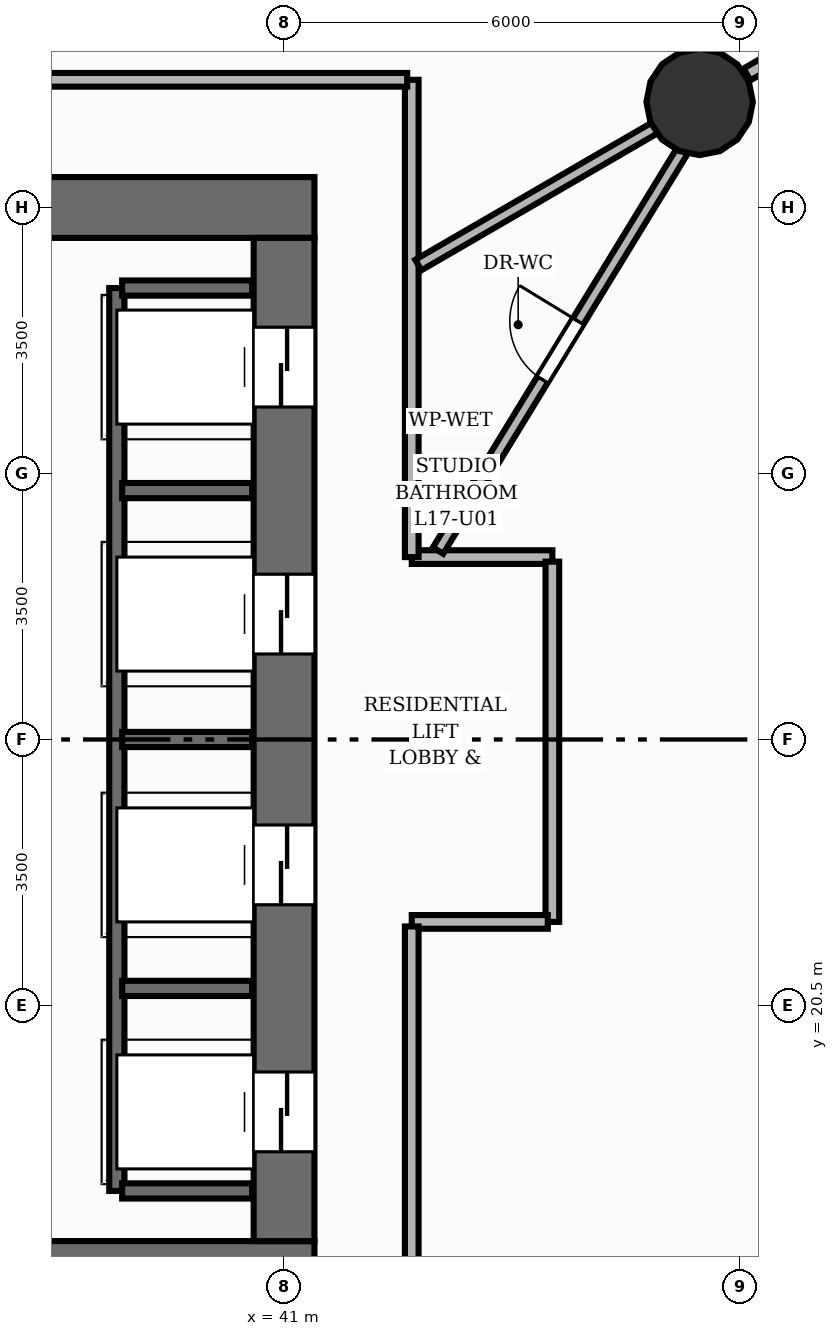
"""IFC4 building model, lengths in metres.
Left out: names, types, materials, properties, quantities, classifications, styles, units other than length and angle.
Written with IfcOpenShell. Run it as: python <this file> out.ifc"""

import sys

from ifc_helpers import new_model, si_unit, direction, frame, frame_2d, origin, origin_2d, place, context, subcontext, project, spatial, rectangle, circle, extrude, element, fill, save


model = new_model("IFC4")
c1 = context("Model", 3, precision=1e-05, world=origin(), true_north=direction((0.0, 1.0)))
c2 = subcontext(c1, "Body", "Model", "MODEL_VIEW")
j1 = project(units=[si_unit("LENGTHUNIT", "METRE"), si_unit("PLANEANGLEUNIT", "RADIAN")], contexts=[c1])
p1 = place(None, origin())
s1 = spatial("IfcSite", under=j1, at=p1, CompositionType="ELEMENT")
p2 = place(p1, origin())
s2 = spatial("IfcBuilding", under=s1, at=p2, CompositionType="ELEMENT")
p3 = place(p2, frame((0.0, 0.0, 60.0)))
s3 = spatial("IfcBuildingStorey", under=s2, at=p3, CompositionType="ELEMENT", Elevation=60.0)
p4 = place(p3, frame((22.6, 17.0, 0.0), z_axis=(0.0, 0.0, 1.0), x_axis=(1.0, 0.0, 0.0)))
e1 = element("IfcWall", 1, at=p4, inside=s3, PredefinedType="SHEAR", context=c2, shape_type="SweptSolid", body=[
    extrude(rectangle(XDim=18.8, YDim=0.8, at=frame_2d((9.4, 0.0))), origin(), (0.0, 0.0, 1.0), 3.2),
])
p5 = place(p4, frame((5.9, 0.0, 0.0)))
e2 = element("IfcOpeningElement", 2, at=p5, cuts=e1, PredefinedType="OPENING", context=c2, shape_type="SweptSolid", body=[
    extrude(rectangle(XDim=1.1, YDim=2.15, at=frame_2d((0.55, 1.075))), frame((0.0, 0.41, 0.0), z_axis=(0.0, -1.0, 0.0), x_axis=(1.0, 0.0, 0.0)), (0.0, 0.0, 1.0), 0.82),
])
p6 = place(p4, frame((9.45, 0.0, 0.0)))
e3 = element("IfcOpeningElement", 3, at=p6, cuts=e1, PredefinedType="OPENING", context=c2, shape_type="SweptSolid", body=[
    extrude(rectangle(XDim=0.9, YDim=2.1, at=frame_2d((0.45, 1.05))), frame((0.0, 0.41, 0.0), z_axis=(0.0, -1.0, 0.0), x_axis=(1.0, 0.0, 0.0)), (0.0, 0.0, 1.0), 0.82),
])
p7 = place(p3, frame((22.6, 31.0, 0.0), z_axis=(0.0, 0.0, 1.0), x_axis=(1.0, 0.0, 0.0)))
e4 = element("IfcWall", 4, at=p7, inside=s3, PredefinedType="SHEAR", context=c2, shape_type="SweptSolid", body=[
    extrude(rectangle(XDim=18.8, YDim=0.8, at=frame_2d((9.4, 0.0))), origin(), (0.0, 0.0, 1.0), 3.2),
])
p8 = place(p7, frame((11.8, 0.0, 0.0)))
e5 = element("IfcOpeningElement", 5, at=p8, cuts=e4, PredefinedType="OPENING", context=c2, shape_type="SweptSolid", body=[
    extrude(rectangle(XDim=1.1, YDim=2.15, at=frame_2d((0.55, 1.075))), frame((0.0, 0.41, 0.0), z_axis=(0.0, -1.0, 0.0), x_axis=(1.0, 0.0, 0.0)), (0.0, 0.0, 1.0), 0.82),
])
p9 = place(p3, frame((41.0, 17.4, 0.0), z_axis=(0.0, 0.0, 1.0), x_axis=(0.0, 1.0, 0.0)))
e6 = element("IfcWall", 6, at=p9, inside=s3, PredefinedType="SHEAR", context=c2, shape_type="SweptSolid", body=[
    extrude(rectangle(XDim=13.2, YDim=0.8, at=frame_2d((6.6, 0.0))), origin(), (0.0, 0.0, 1.0), 3.2),
])
p10 = place(p9, frame((1.175, 0.0, 0.0)))
e7 = element("IfcOpeningElement", 7, at=p10, cuts=e6, PredefinedType="OPENING", context=c2, shape_type="SweptSolid", body=[
    extrude(rectangle(XDim=1.05, YDim=2.15, at=frame_2d((0.525, 1.075))), frame((0.0, 0.41, 0.0), z_axis=(0.0, -1.0, 0.0), x_axis=(1.0, 0.0, 0.0)), (0.0, 0.0, 1.0), 0.82),
])
p11 = place(p9, frame((4.425, 0.0, 0.0)))
e8 = element("IfcOpeningElement", 8, at=p11, cuts=e6, PredefinedType="OPENING", context=c2, shape_type="SweptSolid", body=[
    extrude(rectangle(XDim=1.05, YDim=2.15, at=frame_2d((0.525, 1.075))), frame((0.0, 0.41, 0.0), z_axis=(0.0, -1.0, 0.0), x_axis=(1.0, 0.0, 0.0)), (0.0, 0.0, 1.0), 0.82),
])
p12 = place(p9, frame((7.725, 0.0, 0.0)))
e9 = element("IfcOpeningElement", 9, at=p12, cuts=e6, PredefinedType="OPENING", context=c2, shape_type="SweptSolid", body=[
    extrude(rectangle(XDim=1.05, YDim=2.15, at=frame_2d((0.525, 1.075))), frame((0.0, 0.41, 0.0), z_axis=(0.0, -1.0, 0.0), x_axis=(1.0, 0.0, 0.0)), (0.0, 0.0, 1.0), 0.82),
])
p13 = place(p9, frame((10.975, 0.0, 0.0)))
e10 = element("IfcOpeningElement", 10, at=p13, cuts=e6, PredefinedType="OPENING", context=c2, shape_type="SweptSolid", body=[
    extrude(rectangle(XDim=1.05, YDim=2.15, at=frame_2d((0.525, 1.075))), frame((0.0, 0.41, 0.0), z_axis=(0.0, -1.0, 0.0), x_axis=(1.0, 0.0, 0.0)), (0.0, 0.0, 1.0), 0.82),
])
p14 = place(p3, frame((46.468, 32.389, 0.0), z_axis=(0.0, 0.0, 1.0), x_axis=(1.0, 0.0, 0.0)))
e11 = element("IfcColumn", 11, at=p14, inside=s3, PredefinedType="COLUMN", context=c2, shape_type="SweptSolid", body=[
    extrude(circle(Radius=0.7, at=origin_2d()), origin(), (0.0, 0.0, 1.0), 3.2),
])
p15 = place(p3, frame((38.8, 18.06, 0.0), z_axis=(0.0, 0.0, 1.0), x_axis=(0.0, 1.0, 0.0)))
e12 = element("IfcWall", 12, at=p15, inside=s3, PredefinedType="SHEAR", context=c2, shape_type="SweptSolid", body=[
    extrude(rectangle(XDim=11.88, YDim=0.2, at=frame_2d((5.94, 0.0))), origin(), (0.0, 0.0, 1.0), 3.2),
])
for number, where, z_axis, x_axis in (
    (13, (38.87, 18.06, 0.0), (0.0, 0.0, 1.0), (1.0, 0.0, 0.0)),
    (14, (38.87, 29.94, 0.0), (0.0, 0.0, 1.0), (1.0, 0.0, 0.0)),
    (15, (38.87, 20.725, 0.0), (0.0, 0.0, 1.0), (1.0, 0.0, 0.0)),
    (16, (38.87, 24.0, 0.0), (0.0, 0.0, 1.0), (1.0, 0.0, 0.0)),
    (17, (38.87, 27.275, 0.0), (0.0, 0.0, 1.0), (1.0, 0.0, 0.0)),
):
    element("IfcWall", number, at=place(p3, frame(where, z_axis=z_axis, x_axis=x_axis)), inside=s3, PredefinedType="SHEAR", context=c2, shape_type="SweptSolid", body=[
        extrude(rectangle(XDim=1.71, YDim=0.2, at=frame_2d((0.855, 0.0))), origin(), (0.0, 0.0, 1.0), 3.2),
    ])
p16 = place(p3, frame((47.091, 32.75, 0.0), z_axis=(0.0, 0.0, 1.0), x_axis=(0.865028951922, 0.501721947234, 0.0)))
e18 = element("IfcWall", 18, at=p16, inside=s3, PredefinedType="PARTITIONING", context=c2, shape_type="SweptSolid", body=[
    extrude(rectangle(XDim=1.894, YDim=0.18, at=frame_2d((0.947, 0.0))), origin(), (0.0, 0.0, 1.0), 2.178),
])
p17 = place(p3, frame((42.68, 26.4, 0.0), z_axis=(0.0, 0.0, 1.0), x_axis=(1.0, 0.0, 0.0)))
e19 = element("IfcWall", 19, at=p17, inside=s3, PredefinedType="PARTITIONING", context=c2, shape_type="SweptSolid", body=[
    extrude(rectangle(XDim=1.85, YDim=0.18, at=frame_2d((0.925, 0.0))), origin(), (0.0, 0.0, 1.0), 2.178),
])
p18 = place(p3, frame((44.53, 26.34, 0.0), z_axis=(0.0, 0.0, 1.0), x_axis=(0.0, -1.0, 0.0)))
e20 = element("IfcWall", 20, at=p18, inside=s3, PredefinedType="PARTITIONING", context=c2, shape_type="SweptSolid", body=[
    extrude(rectangle(XDim=4.74, YDim=0.18, at=frame_2d((2.37, 0.0))), origin(), (0.0, 0.0, 1.0), 2.955),
])
p19 = place(p3, frame((44.47, 21.6, 0.0), z_axis=(0.0, 0.0, 1.0), x_axis=(-1.0, 0.0, 0.0)))
e21 = element("IfcWall", 21, at=p19, inside=s3, PredefinedType="PARTITIONING", context=c2, shape_type="SweptSolid", body=[
    extrude(rectangle(XDim=1.79, YDim=0.18, at=frame_2d((0.895, 0.0))), origin(), (0.0, 0.0, 1.0), 2.178),
])
p20 = place(p3, frame((42.68, 21.54, 0.0), z_axis=(0.0, 0.0, 1.0), x_axis=(0.0, -1.0, 0.0)))
e22 = element("IfcWall", 22, at=p20, inside=s3, PredefinedType="PARTITIONING", context=c2, shape_type="SweptSolid", body=[
    extrude(rectangle(XDim=6.22, YDim=0.18, at=frame_2d((3.11, 0.0))), origin(), (0.0, 0.0, 1.0), 2.955),
])
p21 = place(p3, frame((42.68, 32.68, 0.0), z_axis=(0.0, 0.0, 1.0), x_axis=(0.0, -1.0, 0.0)))
e23 = element("IfcWall", 23, at=p21, inside=s3, PredefinedType="PARTITIONING", context=c2, shape_type="SweptSolid", body=[
    extrude(rectangle(XDim=6.28, YDim=0.18, at=frame_2d((3.14, 0.0))), origin(), (0.0, 0.0, 1.0), 2.955),
])
p22 = place(p3, frame((21.32, 32.68, 0.0), z_axis=(0.0, 0.0, 1.0), x_axis=(1.0, 0.0, 0.0)))
e24 = element("IfcWall", 24, at=p22, inside=s3, PredefinedType="PARTITIONING", context=c2, shape_type="SweptSolid", body=[
    extrude(rectangle(XDim=21.3, YDim=0.18, at=frame_2d((10.65, 0.0))), origin(), (0.0, 0.0, 1.0), 2.955),
])
p23 = place(p22, frame((13.68, 0.0, 0.0)))
e25 = element("IfcOpeningElement", 25, at=p23, cuts=e24, PredefinedType="OPENING", context=c2, shape_type="SweptSolid", body=[
    extrude(rectangle(XDim=1.05, YDim=2.15, at=frame_2d((0.525, 1.075))), frame((0.0, 0.1, 0.0), z_axis=(0.0, -1.0, 0.0), x_axis=(1.0, 0.0, 0.0)), (0.0, 0.0, 1.0), 0.2),
])
p24 = place(p3, frame((43.026, 26.485, 0.0), z_axis=(0.0, 0.0, 1.0), x_axis=(0.521413206751, 0.853304323103, 0.0)))
e26 = element("IfcWall", 26, at=p24, inside=s3, PredefinedType="PLUMBINGWALL", context=c2, shape_type="SweptSolid", body=[
    extrude(rectangle(XDim=6.172, YDim=0.16, at=frame_2d((3.086, 0.0))), origin(), (0.0, 0.0, 1.0), 2.955),
])
p25 = place(p24, frame((2.636, 0.0, 0.0)))
e27 = element("IfcOpeningElement", 27, at=p25, cuts=e26, PredefinedType="OPENING", context=c2, shape_type="SweptSolid", body=[
    extrude(rectangle(XDim=0.9, YDim=2.1, at=frame_2d((0.45, 1.05))), frame((0.0, 0.09, 0.0), z_axis=(0.0, -1.0, 0.0), x_axis=(1.0, 0.0, 0.0)), (0.0, 0.0, 1.0), 0.18),
])
p26 = place(p3, frame((42.767, 30.243, 0.0), z_axis=(0.0, 0.0, 1.0), x_axis=(0.865055926686, 0.501675436617, 0.0)))
e28 = element("IfcWall", 28, at=p26, inside=s3, PredefinedType="PLUMBINGWALL", context=c2, shape_type="SweptSolid", body=[
    extrude(rectangle(XDim=3.598, YDim=0.16, at=frame_2d((1.799, 0.0))), origin(), (0.0, 0.0, 1.0), 2.178),
])
p27 = place(p10, origin())
e29 = element("IfcDoor", 29, at=p27, inside=s3, OperationType="DOUBLE_DOOR_SLIDING", PredefinedType="DOOR", context=c2, shape_type="SweptSolid", body=[
    extrude(rectangle(XDim=1.05, YDim=2.15, at=frame_2d((0.525, 1.075))), frame((0.0, 0.025, 0.0), z_axis=(0.0, -1.0, 0.0), x_axis=(1.0, 0.0, 0.0)), (0.0, 0.0, 1.0), 0.05),
])
fill(e7, e29)
p28 = place(p11, origin())
e30 = element("IfcDoor", 30, at=p28, inside=s3, OperationType="DOUBLE_DOOR_SLIDING", PredefinedType="DOOR", context=c2, shape_type="SweptSolid", body=[
    extrude(rectangle(XDim=1.05, YDim=2.15, at=frame_2d((0.525, 1.075))), frame((0.0, 0.025, 0.0), z_axis=(0.0, -1.0, 0.0), x_axis=(1.0, 0.0, 0.0)), (0.0, 0.0, 1.0), 0.05),
])
fill(e8, e30)
p29 = place(p12, origin())
e31 = element("IfcDoor", 31, at=p29, inside=s3, OperationType="DOUBLE_DOOR_SLIDING", PredefinedType="DOOR", context=c2, shape_type="SweptSolid", body=[
    extrude(rectangle(XDim=1.05, YDim=2.15, at=frame_2d((0.525, 1.075))), frame((0.0, 0.025, 0.0), z_axis=(0.0, -1.0, 0.0), x_axis=(1.0, 0.0, 0.0)), (0.0, 0.0, 1.0), 0.05),
])
fill(e9, e31)
p30 = place(p13, origin())
e32 = element("IfcDoor", 32, at=p30, inside=s3, OperationType="DOUBLE_DOOR_SLIDING", PredefinedType="DOOR", context=c2, shape_type="SweptSolid", body=[
    extrude(rectangle(XDim=1.05, YDim=2.15, at=frame_2d((0.525, 1.075))), frame((0.0, 0.025, 0.0), z_axis=(0.0, -1.0, 0.0), x_axis=(1.0, 0.0, 0.0)), (0.0, 0.0, 1.0), 0.05),
])
fill(e10, e32)
p31 = place(p25, origin())
e33 = element("IfcDoor", 33, at=p31, inside=s3, OperationType="SINGLE_SWING_RIGHT", PredefinedType="DOOR", context=c2, shape_type="SweptSolid", body=[
    extrude(rectangle(XDim=0.9, YDim=2.1, at=frame_2d((0.45, 1.05))), frame((0.0, 0.025, 0.0), z_axis=(0.0, -1.0, 0.0), x_axis=(1.0, 0.0, 0.0)), (0.0, 0.0, 1.0), 0.05),
])
fill(e27, e33)
save(model, sys.argv[1])
